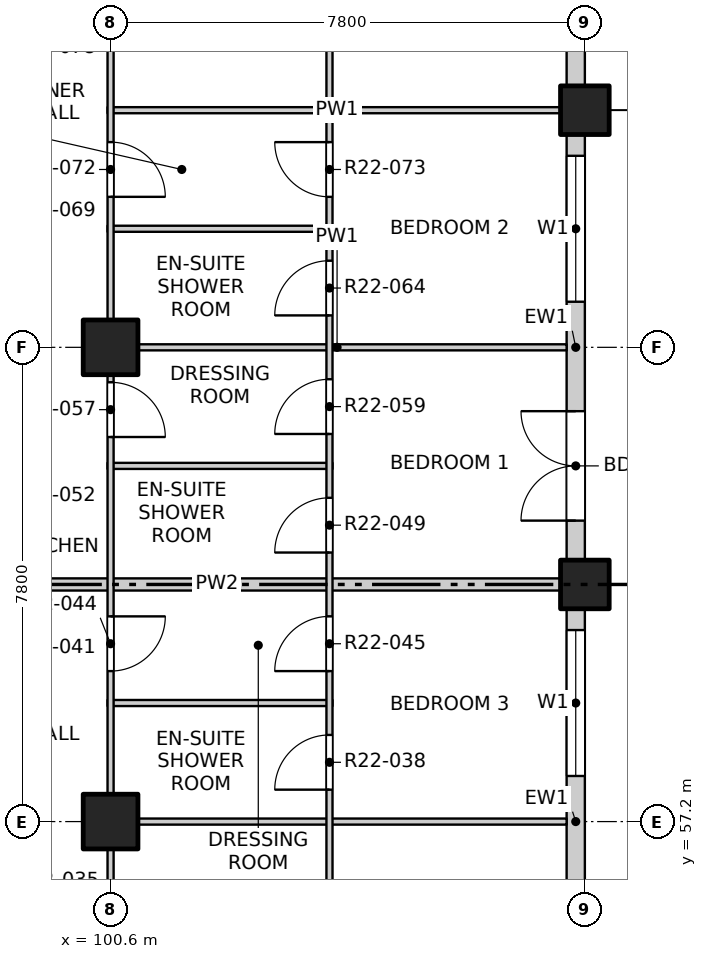
"""IFC4 building model, lengths in metres.
Left out: names, types, materials, properties, quantities, classifications, styles, units other than length and angle.
Written with IfcOpenShell. Run it as: python <this file> out.ifc"""

import sys

from ifc_helpers import new_model, si_unit, direction, frame, frame_2d, origin, origin_2d, place, context, subcontext, project, spatial, rectangle, extrude, element, fill, save


model = new_model("IFC4")
c1 = context("Model", 3, precision=1e-05, world=origin(), true_north=direction((0.0, 1.0)))
c2 = subcontext(c1, "Body", "Model", "MODEL_VIEW")
j1 = project(units=[si_unit("LENGTHUNIT", "METRE"), si_unit("PLANEANGLEUNIT", "RADIAN")], contexts=[c1])
p1 = place(None, origin())
s1 = spatial("IfcSite", under=j1, at=p1, CompositionType="ELEMENT")
p2 = place(p1, origin())
s2 = spatial("IfcBuilding", under=s1, at=p2, CompositionType="ELEMENT")
p3 = place(p2, frame((0.0, 0.0, 231.3)))
s3 = spatial("IfcBuildingStorey", under=s2, at=p3, CompositionType="ELEMENT", Elevation=231.3)
for number, where, z_axis, x_axis in (
    (1, (108.4, 61.1, -0.25), (0.0, 0.0, 1.0), (1.0, 0.0, 0.0)),
    (2, (108.4, 68.9, -0.25), (0.0, 0.0, 1.0), (1.0, 0.0, 0.0)),
):
    element("IfcColumn", number, at=place(p3, frame(where, z_axis=z_axis, x_axis=x_axis)), inside=s3, PredefinedType="COLUMN", context=c2, shape_type="SweptSolid", body=[
        extrude(rectangle(XDim=0.8, YDim=0.8, at=origin_2d()), origin(), (0.0, 0.0, 1.0), 3.4),
    ])
for number, where, z_axis, x_axis in (
    (3, (100.6, 57.2, -0.25), (0.0, 0.0, 1.0), (1.0, 0.0, 0.0)),
    (4, (100.6, 65.0, -0.25), (0.0, 0.0, 1.0), (1.0, 0.0, 0.0)),
):
    element("IfcColumn", number, at=place(p3, frame(where, z_axis=z_axis, x_axis=x_axis)), inside=s3, PredefinedType="COLUMN", context=c2, shape_type="SweptSolid", body=[
        extrude(rectangle(XDim=0.9, YDim=0.9, at=origin_2d()), origin(), (0.0, 0.0, 1.0), 3.4),
    ])
p4 = place(p3, frame((108.25, 53.7, 0.0), z_axis=(0.0, 0.0, 1.0), x_axis=(0.0, 1.0, 0.0)))
e5 = element("IfcWall", 5, at=p4, inside=s3, PredefinedType="SOLIDWALL", context=c2, shape_type="SweptSolid", body=[
    extrude(rectangle(XDim=7.0, YDim=0.3, at=frame_2d((3.5, 0.0))), origin(), (0.0, 0.0, 1.0), 2.7),
])
p5 = place(p4, frame((0.65, 0.0, 0.0)))
e6 = element("IfcOpeningElement", 6, at=p5, cuts=e5, PredefinedType="OPENING", context=c2, shape_type="SweptSolid", body=[
    extrude(rectangle(XDim=1.8, YDim=2.4, at=frame_2d((0.9, 1.2))), frame((0.0, 0.16, 0.0), z_axis=(0.0, -1.0, 0.0), x_axis=(1.0, 0.0, 0.0)), (0.0, 0.0, 1.0), 0.32),
])
p6 = place(p4, frame((4.25, 0.0, 0.9)))
e7 = element("IfcOpeningElement", 7, at=p6, cuts=e5, PredefinedType="OPENING", context=c2, shape_type="SweptSolid", body=[
    extrude(rectangle(XDim=2.4, YDim=1.8, at=frame_2d((1.2, 0.9))), frame((0.0, 0.16, 0.0), z_axis=(0.0, -1.0, 0.0), x_axis=(1.0, 0.0, 0.0)), (0.0, 0.0, 1.0), 0.32),
])
p7 = place(p3, frame((108.25, 61.5, 0.0), z_axis=(0.0, 0.0, 1.0), x_axis=(0.0, 1.0, 0.0)))
e8 = element("IfcWall", 8, at=p7, inside=s3, PredefinedType="SOLIDWALL", context=c2, shape_type="SweptSolid", body=[
    extrude(rectangle(XDim=7.0, YDim=0.3, at=frame_2d((3.5, 0.0))), origin(), (0.0, 0.0, 1.0), 2.7),
])
p8 = place(p7, frame((0.65, 0.0, 0.0)))
e9 = element("IfcOpeningElement", 9, at=p8, cuts=e8, PredefinedType="OPENING", context=c2, shape_type="SweptSolid", body=[
    extrude(rectangle(XDim=1.8, YDim=2.4, at=frame_2d((0.9, 1.2))), frame((0.0, 0.16, 0.0), z_axis=(0.0, -1.0, 0.0), x_axis=(1.0, 0.0, 0.0)), (0.0, 0.0, 1.0), 0.32),
])
p9 = place(p7, frame((4.25, 0.0, 0.9)))
e10 = element("IfcOpeningElement", 10, at=p9, cuts=e8, PredefinedType="OPENING", context=c2, shape_type="SweptSolid", body=[
    extrude(rectangle(XDim=2.4, YDim=1.8, at=frame_2d((1.2, 0.9))), frame((0.0, 0.16, 0.0), z_axis=(0.0, -1.0, 0.0), x_axis=(1.0, 0.0, 0.0)), (0.0, 0.0, 1.0), 0.32),
])
p10 = place(p3, frame((108.25, 69.3, 0.0), z_axis=(0.0, 0.0, 1.0), x_axis=(0.0, 1.0, 0.0)))
e11 = element("IfcWall", 11, at=p10, inside=s3, PredefinedType="SOLIDWALL", context=c2, shape_type="SweptSolid", body=[
    extrude(rectangle(XDim=7.0, YDim=0.3, at=frame_2d((3.5, 0.0))), origin(), (0.0, 0.0, 1.0), 2.7),
])
p11 = place(p10, frame((0.65, 0.0, 0.0)))
e12 = element("IfcOpeningElement", 12, at=p11, cuts=e11, PredefinedType="OPENING", context=c2, shape_type="SweptSolid", body=[
    extrude(rectangle(XDim=1.8, YDim=2.4, at=frame_2d((0.9, 1.2))), frame((0.0, 0.16, 0.0), z_axis=(0.0, -1.0, 0.0), x_axis=(1.0, 0.0, 0.0)), (0.0, 0.0, 1.0), 0.32),
])
p12 = place(p10, frame((4.25, 0.0, 0.9)))
e13 = element("IfcOpeningElement", 13, at=p12, cuts=e11, PredefinedType="OPENING", context=c2, shape_type="SweptSolid", body=[
    extrude(rectangle(XDim=2.4, YDim=1.8, at=frame_2d((1.2, 0.9))), frame((0.0, 0.16, 0.0), z_axis=(0.0, -1.0, 0.0), x_axis=(1.0, 0.0, 0.0)), (0.0, 0.0, 1.0), 0.32),
])
p13 = place(p3, frame((100.55, 57.2, 0.0), z_axis=(0.0, 0.0, 1.0), x_axis=(1.0, 0.0, 0.0)))
e14 = element("IfcWall", 14, at=p13, inside=s3, PredefinedType="PARTITIONING", context=c2, shape_type="SweptSolid", body=[
    extrude(rectangle(XDim=7.55, YDim=0.1, at=frame_2d((3.775, 0.0))), origin(), (0.0, 0.0, 1.0), 3.15),
])
p14 = place(p3, frame((100.55, 59.15, 0.0), z_axis=(0.0, 0.0, 1.0), x_axis=(1.0, 0.0, 0.0)))
e15 = element("IfcWall", 15, at=p14, inside=s3, PredefinedType="PARTITIONING", context=c2, shape_type="SweptSolid", body=[
    extrude(rectangle(XDim=3.7, YDim=0.1, at=frame_2d((1.85, 0.0))), origin(), (0.0, 0.0, 1.0), 3.15),
])
p15 = place(p3, frame((96.6, 61.1, 0.0), z_axis=(0.0, 0.0, 1.0), x_axis=(1.0, 0.0, 0.0)))
e16 = element("IfcWall", 16, at=p15, inside=s3, PredefinedType="PARTITIONING", context=c2, shape_type="SweptSolid", body=[
    extrude(rectangle(XDim=11.5, YDim=0.2, at=frame_2d((5.75, 0.0))), origin(), (0.0, 0.0, 1.0), 2.55),
])
p16 = place(p3, frame((100.55, 63.05, 0.0), z_axis=(0.0, 0.0, 1.0), x_axis=(1.0, 0.0, 0.0)))
e17 = element("IfcWall", 17, at=p16, inside=s3, PredefinedType="PARTITIONING", context=c2, shape_type="SweptSolid", body=[
    extrude(rectangle(XDim=3.7, YDim=0.1, at=frame_2d((1.85, 0.0))), origin(), (0.0, 0.0, 1.0), 3.15),
])
p17 = place(p3, frame((100.55, 65.0, 0.0), z_axis=(0.0, 0.0, 1.0), x_axis=(1.0, 0.0, 0.0)))
e18 = element("IfcWall", 18, at=p17, inside=s3, PredefinedType="PARTITIONING", context=c2, shape_type="SweptSolid", body=[
    extrude(rectangle(XDim=7.55, YDim=0.1, at=frame_2d((3.775, 0.0))), origin(), (0.0, 0.0, 1.0), 3.15),
])
p18 = place(p3, frame((100.55, 66.95, 0.0), z_axis=(0.0, 0.0, 1.0), x_axis=(1.0, 0.0, 0.0)))
e19 = element("IfcWall", 19, at=p18, inside=s3, PredefinedType="PARTITIONING", context=c2, shape_type="SweptSolid", body=[
    extrude(rectangle(XDim=3.7, YDim=0.1, at=frame_2d((1.85, 0.0))), origin(), (0.0, 0.0, 1.0), 3.15),
])
p19 = place(p3, frame((100.55, 68.9, 0.0), z_axis=(0.0, 0.0, 1.0), x_axis=(1.0, 0.0, 0.0)))
e20 = element("IfcWall", 20, at=p19, inside=s3, PredefinedType="PARTITIONING", context=c2, shape_type="SweptSolid", body=[
    extrude(rectangle(XDim=7.55, YDim=0.1, at=frame_2d((3.775, 0.0))), origin(), (0.0, 0.0, 1.0), 2.55),
])
p20 = place(p3, frame((100.6, 41.9, 0.0), z_axis=(0.0, 0.0, 1.0), x_axis=(0.0, 1.0, 0.0)))
e21 = element("IfcWall", 21, at=p20, inside=s3, PredefinedType="PARTITIONING", context=c2, shape_type="SweptSolid", body=[
    extrude(rectangle(XDim=46.2, YDim=0.1, at=frame_2d((23.1, 0.0))), origin(), (0.0, 0.0, 1.0), 3.15),
])
p21 = place(p20, frame((1.2, 0.0, 0.0)))
e22 = element("IfcOpeningElement", 22, at=p21, cuts=e21, PredefinedType="OPENING", context=c2, shape_type="SweptSolid", body=[
    extrude(rectangle(XDim=0.9, YDim=2.1, at=frame_2d((0.45, 1.05))), frame((0.0, 0.06, 0.0), z_axis=(0.0, -1.0, 0.0), x_axis=(1.0, 0.0, 0.0)), (0.0, 0.0, 1.0), 0.12),
])
p22 = place(p20, frame((6.025, 0.0, 0.0)))
e23 = element("IfcOpeningElement", 23, at=p22, cuts=e21, PredefinedType="OPENING", context=c2, shape_type="SweptSolid", body=[
    extrude(rectangle(XDim=0.9, YDim=2.1, at=frame_2d((0.45, 1.05))), frame((0.0, 0.06, 0.0), z_axis=(0.0, -1.0, 0.0), x_axis=(1.0, 0.0, 0.0)), (0.0, 0.0, 1.0), 0.12),
])
p23 = place(p20, frame((9.0, 0.0, 0.0)))
e24 = element("IfcOpeningElement", 24, at=p23, cuts=e21, PredefinedType="OPENING", context=c2, shape_type="SweptSolid", body=[
    extrude(rectangle(XDim=0.9, YDim=2.1, at=frame_2d((0.45, 1.05))), frame((0.0, 0.06, 0.0), z_axis=(0.0, -1.0, 0.0), x_axis=(1.0, 0.0, 0.0)), (0.0, 0.0, 1.0), 0.12),
])
p24 = place(p20, frame((12.9, 0.0, 0.0)))
e25 = element("IfcOpeningElement", 25, at=p24, cuts=e21, PredefinedType="OPENING", context=c2, shape_type="SweptSolid", body=[
    extrude(rectangle(XDim=0.9, YDim=2.1, at=frame_2d((0.45, 1.05))), frame((0.0, 0.06, 0.0), z_axis=(0.0, -1.0, 0.0), x_axis=(1.0, 0.0, 0.0)), (0.0, 0.0, 1.0), 0.12),
])
p25 = place(p20, frame((17.775, 0.0, 0.0)))
e26 = element("IfcOpeningElement", 26, at=p25, cuts=e21, PredefinedType="OPENING", context=c2, shape_type="SweptSolid", body=[
    extrude(rectangle(XDim=0.9, YDim=2.1, at=frame_2d((0.45, 1.05))), frame((0.0, 0.06, 0.0), z_axis=(0.0, -1.0, 0.0), x_axis=(1.0, 0.0, 0.0)), (0.0, 0.0, 1.0), 0.12),
])
p26 = place(p20, frame((21.625, 0.0, 0.0)))
e27 = element("IfcOpeningElement", 27, at=p26, cuts=e21, PredefinedType="OPENING", context=c2, shape_type="SweptSolid", body=[
    extrude(rectangle(XDim=0.9, YDim=2.1, at=frame_2d((0.45, 1.05))), frame((0.0, 0.06, 0.0), z_axis=(0.0, -1.0, 0.0), x_axis=(1.0, 0.0, 0.0)), (0.0, 0.0, 1.0), 0.12),
])
p27 = place(p20, frame((25.575, 0.0, 0.0)))
e28 = element("IfcOpeningElement", 28, at=p27, cuts=e21, PredefinedType="OPENING", context=c2, shape_type="SweptSolid", body=[
    extrude(rectangle(XDim=0.9, YDim=2.1, at=frame_2d((0.45, 1.05))), frame((0.0, 0.06, 0.0), z_axis=(0.0, -1.0, 0.0), x_axis=(1.0, 0.0, 0.0)), (0.0, 0.0, 1.0), 0.12),
])
p28 = place(p20, frame((28.5, 0.0, 0.0)))
e29 = element("IfcOpeningElement", 29, at=p28, cuts=e21, PredefinedType="OPENING", context=c2, shape_type="SweptSolid", body=[
    extrude(rectangle(XDim=0.9, YDim=2.1, at=frame_2d((0.45, 1.05))), frame((0.0, 0.06, 0.0), z_axis=(0.0, -1.0, 0.0), x_axis=(1.0, 0.0, 0.0)), (0.0, 0.0, 1.0), 0.12),
])
p29 = place(p20, frame((33.375, 0.0, 0.0)))
e30 = element("IfcOpeningElement", 30, at=p29, cuts=e21, PredefinedType="OPENING", context=c2, shape_type="SweptSolid", body=[
    extrude(rectangle(XDim=0.9, YDim=2.1, at=frame_2d((0.45, 1.05))), frame((0.0, 0.06, 0.0), z_axis=(0.0, -1.0, 0.0), x_axis=(1.0, 0.0, 0.0)), (0.0, 0.0, 1.0), 0.12),
])
p30 = place(p20, frame((36.3, 0.0, 0.0)))
e31 = element("IfcOpeningElement", 31, at=p30, cuts=e21, PredefinedType="OPENING", context=c2, shape_type="SweptSolid", body=[
    extrude(rectangle(XDim=0.9, YDim=2.1, at=frame_2d((0.45, 1.05))), frame((0.0, 0.06, 0.0), z_axis=(0.0, -1.0, 0.0), x_axis=(1.0, 0.0, 0.0)), (0.0, 0.0, 1.0), 0.12),
])
p31 = place(p20, frame((40.2, 0.0, 0.0)))
e32 = element("IfcOpeningElement", 32, at=p31, cuts=e21, PredefinedType="OPENING", context=c2, shape_type="SweptSolid", body=[
    extrude(rectangle(XDim=0.9, YDim=2.1, at=frame_2d((0.45, 1.05))), frame((0.0, 0.06, 0.0), z_axis=(0.0, -1.0, 0.0), x_axis=(1.0, 0.0, 0.0)), (0.0, 0.0, 1.0), 0.12),
])
p32 = place(p20, frame((44.1, 0.0, 0.0)))
e33 = element("IfcOpeningElement", 33, at=p32, cuts=e21, PredefinedType="OPENING", context=c2, shape_type="SweptSolid", body=[
    extrude(rectangle(XDim=0.9, YDim=2.1, at=frame_2d((0.45, 1.05))), frame((0.0, 0.06, 0.0), z_axis=(0.0, -1.0, 0.0), x_axis=(1.0, 0.0, 0.0)), (0.0, 0.0, 1.0), 0.12),
])
p33 = place(p3, frame((104.2, 41.9, 0.0), z_axis=(0.0, 0.0, 1.0), x_axis=(0.0, 1.0, 0.0)))
e34 = element("IfcWall", 34, at=p33, inside=s3, PredefinedType="PARTITIONING", context=c2, shape_type="SweptSolid", body=[
    extrude(rectangle(XDim=34.7, YDim=0.1, at=frame_2d((17.35, 0.0))), origin(), (0.0, 0.0, 1.0), 3.15),
])
p34 = place(p33, frame((1.05, 0.0, 0.0)))
e35 = element("IfcOpeningElement", 35, at=p34, cuts=e34, PredefinedType="OPENING", context=c2, shape_type="SweptSolid", body=[
    extrude(rectangle(XDim=1.2, YDim=2.1, at=frame_2d((0.6, 1.05))), frame((0.0, 0.06, 0.0), z_axis=(0.0, -1.0, 0.0), x_axis=(1.0, 0.0, 0.0)), (0.0, 0.0, 1.0), 0.12),
])
p35 = place(p33, frame((4.125, 0.0, 0.0)))
e36 = element("IfcOpeningElement", 36, at=p35, cuts=e34, PredefinedType="OPENING", context=c2, shape_type="SweptSolid", body=[
    extrude(rectangle(XDim=0.9, YDim=2.1, at=frame_2d((0.45, 1.05))), frame((0.0, 0.06, 0.0), z_axis=(0.0, -1.0, 0.0), x_axis=(1.0, 0.0, 0.0)), (0.0, 0.0, 1.0), 0.12),
])
p36 = place(p33, frame((6.075, 0.0, 0.0)))
e37 = element("IfcOpeningElement", 37, at=p36, cuts=e34, PredefinedType="OPENING", context=c2, shape_type="SweptSolid", body=[
    extrude(rectangle(XDim=0.9, YDim=2.1, at=frame_2d((0.45, 1.05))), frame((0.0, 0.06, 0.0), z_axis=(0.0, -1.0, 0.0), x_axis=(1.0, 0.0, 0.0)), (0.0, 0.0, 1.0), 0.12),
])
p37 = place(p33, frame((8.85, 0.0, 0.0)))
e38 = element("IfcOpeningElement", 38, at=p37, cuts=e34, PredefinedType="OPENING", context=c2, shape_type="SweptSolid", body=[
    extrude(rectangle(XDim=1.2, YDim=2.1, at=frame_2d((0.6, 1.05))), frame((0.0, 0.06, 0.0), z_axis=(0.0, -1.0, 0.0), x_axis=(1.0, 0.0, 0.0)), (0.0, 0.0, 1.0), 0.12),
])
p38 = place(p33, frame((12.75, 0.0, 0.0)))
e39 = element("IfcOpeningElement", 39, at=p38, cuts=e34, PredefinedType="OPENING", context=c2, shape_type="SweptSolid", body=[
    extrude(rectangle(XDim=1.2, YDim=2.1, at=frame_2d((0.6, 1.05))), frame((0.0, 0.06, 0.0), z_axis=(0.0, -1.0, 0.0), x_axis=(1.0, 0.0, 0.0)), (0.0, 0.0, 1.0), 0.12),
])
p39 = place(p33, frame((15.825, 0.0, 0.0)))
e40 = element("IfcOpeningElement", 40, at=p39, cuts=e34, PredefinedType="OPENING", context=c2, shape_type="SweptSolid", body=[
    extrude(rectangle(XDim=0.9, YDim=2.1, at=frame_2d((0.45, 1.05))), frame((0.0, 0.06, 0.0), z_axis=(0.0, -1.0, 0.0), x_axis=(1.0, 0.0, 0.0)), (0.0, 0.0, 1.0), 0.12),
])
p40 = place(p33, frame((17.775, 0.0, 0.0)))
e41 = element("IfcOpeningElement", 41, at=p40, cuts=e34, PredefinedType="OPENING", context=c2, shape_type="SweptSolid", body=[
    extrude(rectangle(XDim=0.9, YDim=2.1, at=frame_2d((0.45, 1.05))), frame((0.0, 0.06, 0.0), z_axis=(0.0, -1.0, 0.0), x_axis=(1.0, 0.0, 0.0)), (0.0, 0.0, 1.0), 0.12),
])
p41 = place(p33, frame((19.725, 0.0, 0.0)))
e42 = element("IfcOpeningElement", 42, at=p41, cuts=e34, PredefinedType="OPENING", context=c2, shape_type="SweptSolid", body=[
    extrude(rectangle(XDim=0.9, YDim=2.1, at=frame_2d((0.45, 1.05))), frame((0.0, 0.06, 0.0), z_axis=(0.0, -1.0, 0.0), x_axis=(1.0, 0.0, 0.0)), (0.0, 0.0, 1.0), 0.12),
])
p42 = place(p33, frame((21.675, 0.0, 0.0)))
e43 = element("IfcOpeningElement", 43, at=p42, cuts=e34, PredefinedType="OPENING", context=c2, shape_type="SweptSolid", body=[
    extrude(rectangle(XDim=0.9, YDim=2.1, at=frame_2d((0.45, 1.05))), frame((0.0, 0.06, 0.0), z_axis=(0.0, -1.0, 0.0), x_axis=(1.0, 0.0, 0.0)), (0.0, 0.0, 1.0), 0.12),
])
p43 = place(p33, frame((23.625, 0.0, 0.0)))
e44 = element("IfcOpeningElement", 44, at=p43, cuts=e34, PredefinedType="OPENING", context=c2, shape_type="SweptSolid", body=[
    extrude(rectangle(XDim=0.9, YDim=2.1, at=frame_2d((0.45, 1.05))), frame((0.0, 0.06, 0.0), z_axis=(0.0, -1.0, 0.0), x_axis=(1.0, 0.0, 0.0)), (0.0, 0.0, 1.0), 0.12),
])
p44 = place(p33, frame((25.575, 0.0, 0.0)))
e45 = element("IfcOpeningElement", 45, at=p44, cuts=e34, PredefinedType="OPENING", context=c2, shape_type="SweptSolid", body=[
    extrude(rectangle(XDim=0.9, YDim=2.1, at=frame_2d((0.45, 1.05))), frame((0.0, 0.06, 0.0), z_axis=(0.0, -1.0, 0.0), x_axis=(1.0, 0.0, 0.0)), (0.0, 0.0, 1.0), 0.12),
])
p45 = place(p33, frame((28.35, 0.0, 0.0)))
e46 = element("IfcOpeningElement", 46, at=p45, cuts=e34, PredefinedType="OPENING", context=c2, shape_type="SweptSolid", body=[
    extrude(rectangle(XDim=1.2, YDim=2.1, at=frame_2d((0.6, 1.05))), frame((0.0, 0.06, 0.0), z_axis=(0.0, -1.0, 0.0), x_axis=(1.0, 0.0, 0.0)), (0.0, 0.0, 1.0), 0.12),
])
p46 = place(p33, frame((31.425, 0.0, 0.0)))
e47 = element("IfcOpeningElement", 47, at=p46, cuts=e34, PredefinedType="OPENING", context=c2, shape_type="SweptSolid", body=[
    extrude(rectangle(XDim=0.9, YDim=2.1, at=frame_2d((0.45, 1.05))), frame((0.0, 0.06, 0.0), z_axis=(0.0, -1.0, 0.0), x_axis=(1.0, 0.0, 0.0)), (0.0, 0.0, 1.0), 0.12),
])
p47 = place(p33, frame((33.375, 0.0, 0.0)))
e48 = element("IfcOpeningElement", 48, at=p47, cuts=e34, PredefinedType="OPENING", context=c2, shape_type="SweptSolid", body=[
    extrude(rectangle(XDim=0.9, YDim=2.1, at=frame_2d((0.45, 1.05))), frame((0.0, 0.06, 0.0), z_axis=(0.0, -1.0, 0.0), x_axis=(1.0, 0.0, 0.0)), (0.0, 0.0, 1.0), 0.12),
])
p48 = place(p6, origin())
e49 = element("IfcWindow", 49, at=p48, inside=s3, PartitioningType="DOUBLE_PANEL_VERTICAL", PredefinedType="WINDOW", context=c2, shape_type="SweptSolid", body=[
    extrude(rectangle(XDim=2.4, YDim=1.8, at=frame_2d((1.2, 0.9))), frame((0.0, 0.03, 0.0), z_axis=(0.0, -1.0, 0.0), x_axis=(1.0, 0.0, 0.0)), (0.0, 0.0, 1.0), 0.06),
])
fill(e7, e49)
p49 = place(p8, origin())
e50 = element("IfcDoor", 50, at=p49, inside=s3, OperationType="DOUBLE_DOOR_SINGLE_SWING", PredefinedType="DOOR", context=c2, shape_type="SweptSolid", body=[
    extrude(rectangle(XDim=1.8, YDim=2.4, at=frame_2d((0.9, 1.2))), frame((0.0, 0.025, 0.0), z_axis=(0.0, -1.0, 0.0), x_axis=(1.0, 0.0, 0.0)), (0.0, 0.0, 1.0), 0.05),
])
fill(e9, e50)
p50 = place(p9, origin())
e51 = element("IfcWindow", 51, at=p50, inside=s3, PartitioningType="DOUBLE_PANEL_VERTICAL", PredefinedType="WINDOW", context=c2, shape_type="SweptSolid", body=[
    extrude(rectangle(XDim=2.4, YDim=1.8, at=frame_2d((1.2, 0.9))), frame((0.0, 0.03, 0.0), z_axis=(0.0, -1.0, 0.0), x_axis=(1.0, 0.0, 0.0)), (0.0, 0.0, 1.0), 0.06),
])
fill(e10, e51)
p51 = place(p39, origin())
e52 = element("IfcDoor", 52, at=p51, inside=s3, OperationType="SINGLE_SWING_LEFT", PredefinedType="DOOR", context=c2, shape_type="SweptSolid", body=[
    extrude(rectangle(XDim=0.9, YDim=2.1, at=frame_2d((0.45, 1.05))), frame((0.0, 0.025, 0.0), z_axis=(0.0, -1.0, 0.0), x_axis=(1.0, 0.0, 0.0)), (0.0, 0.0, 1.0), 0.05),
])
fill(e40, e52)
p52 = place(p25, origin())
e53 = element("IfcDoor", 53, at=p52, inside=s3, OperationType="SINGLE_SWING_LEFT", PredefinedType="DOOR", context=c2, shape_type="SweptSolid", body=[
    extrude(rectangle(XDim=0.9, YDim=2.1, at=frame_2d((0.45, 1.05))), frame((0.0, 0.025, 0.0), z_axis=(0.0, -1.0, 0.0), x_axis=(1.0, 0.0, 0.0)), (0.0, 0.0, 1.0), 0.05),
])
fill(e26, e53)
p53 = place(p40, origin())
e54 = element("IfcDoor", 54, at=p53, inside=s3, OperationType="SINGLE_SWING_LEFT", PredefinedType="DOOR", context=c2, shape_type="SweptSolid", body=[
    extrude(rectangle(XDim=0.9, YDim=2.1, at=frame_2d((0.45, 1.05))), frame((0.0, 0.025, 0.0), z_axis=(0.0, -1.0, 0.0), x_axis=(1.0, 0.0, 0.0)), (0.0, 0.0, 1.0), 0.05),
])
fill(e41, e54)
p54 = place(p41, origin())
e55 = element("IfcDoor", 55, at=p54, inside=s3, OperationType="SINGLE_SWING_LEFT", PredefinedType="DOOR", context=c2, shape_type="SweptSolid", body=[
    extrude(rectangle(XDim=0.9, YDim=2.1, at=frame_2d((0.45, 1.05))), frame((0.0, 0.025, 0.0), z_axis=(0.0, -1.0, 0.0), x_axis=(1.0, 0.0, 0.0)), (0.0, 0.0, 1.0), 0.05),
])
fill(e42, e55)
p55 = place(p26, origin())
e56 = element("IfcDoor", 56, at=p55, inside=s3, OperationType="SINGLE_SWING_RIGHT", PredefinedType="DOOR", context=c2, shape_type="SweptSolid", body=[
    extrude(rectangle(XDim=0.9, YDim=2.1, at=frame_2d((0.45, 1.05))), frame((0.0, 0.025, 0.0), z_axis=(0.0, -1.0, 0.0), x_axis=(1.0, 0.0, 0.0)), (0.0, 0.0, 1.0), 0.05),
])
fill(e27, e56)
p56 = place(p42, origin())
e57 = element("IfcDoor", 57, at=p56, inside=s3, OperationType="SINGLE_SWING_LEFT", PredefinedType="DOOR", context=c2, shape_type="SweptSolid", body=[
    extrude(rectangle(XDim=0.9, YDim=2.1, at=frame_2d((0.45, 1.05))), frame((0.0, 0.025, 0.0), z_axis=(0.0, -1.0, 0.0), x_axis=(1.0, 0.0, 0.0)), (0.0, 0.0, 1.0), 0.05),
])
fill(e43, e57)
p57 = place(p43, origin())
e58 = element("IfcDoor", 58, at=p57, inside=s3, OperationType="SINGLE_SWING_LEFT", PredefinedType="DOOR", context=c2, shape_type="SweptSolid", body=[
    extrude(rectangle(XDim=0.9, YDim=2.1, at=frame_2d((0.45, 1.05))), frame((0.0, 0.025, 0.0), z_axis=(0.0, -1.0, 0.0), x_axis=(1.0, 0.0, 0.0)), (0.0, 0.0, 1.0), 0.05),
])
fill(e44, e58)
p58 = place(p27, origin())
e59 = element("IfcDoor", 59, at=p58, inside=s3, OperationType="SINGLE_SWING_RIGHT", PredefinedType="DOOR", context=c2, shape_type="SweptSolid", body=[
    extrude(rectangle(XDim=0.9, YDim=2.1, at=frame_2d((0.45, 1.05))), frame((0.0, 0.025, 0.0), z_axis=(0.0, -1.0, 0.0), x_axis=(1.0, 0.0, 0.0)), (0.0, 0.0, 1.0), 0.05),
])
fill(e28, e59)
p59 = place(p44, origin())
e60 = element("IfcDoor", 60, at=p59, inside=s3, OperationType="SINGLE_SWING_RIGHT", PredefinedType="DOOR", context=c2, shape_type="SweptSolid", body=[
    extrude(rectangle(XDim=0.9, YDim=2.1, at=frame_2d((0.45, 1.05))), frame((0.0, 0.025, 0.0), z_axis=(0.0, -1.0, 0.0), x_axis=(1.0, 0.0, 0.0)), (0.0, 0.0, 1.0), 0.05),
])
fill(e45, e60)
save(model, sys.argv[1])
